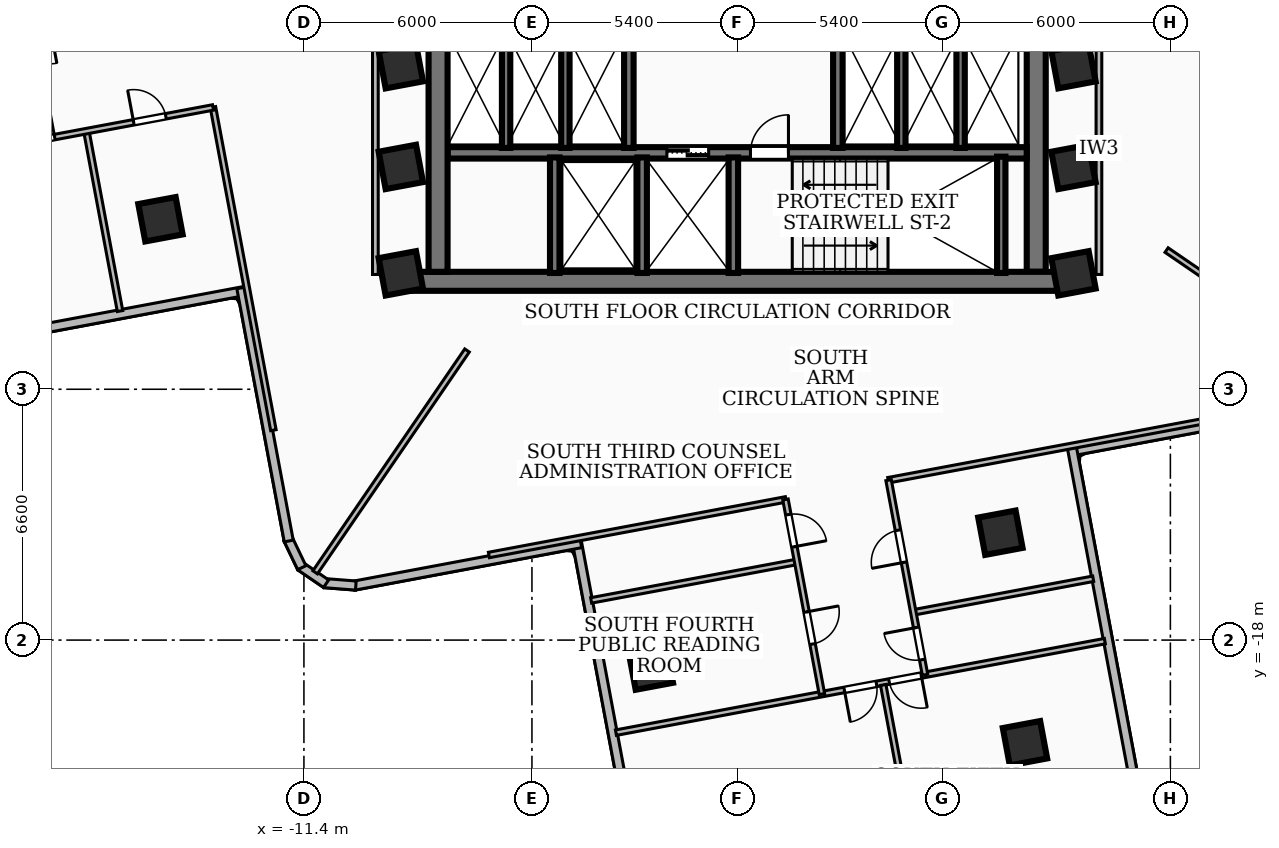
"""IFC4 building model, lengths in metres.
Left out: names, types, materials, properties, quantities, classifications, styles, units other than length and angle.
Written with IfcOpenShell. Run it as: python <this file> out.ifc"""

import sys

from ifc_helpers import new_model, si_unit, direction, frame, frame_2d, origin, origin_2d, place, context, subcontext, project, spatial, rectangle, extrude, element, fill, save


model = new_model("IFC4")
c1 = context("Model", 3, precision=1e-05, world=origin(), true_north=direction((0.0, 1.0)))
c2 = subcontext(c1, "Body", "Model", "MODEL_VIEW")
j1 = project(units=[si_unit("LENGTHUNIT", "METRE"), si_unit("PLANEANGLEUNIT", "RADIAN")], contexts=[c1])
p1 = place(None, origin())
s1 = spatial("IfcSite", under=j1, at=p1, CompositionType="ELEMENT")
p2 = place(p1, origin())
s2 = spatial("IfcBuilding", under=s1, at=p2, CompositionType="ELEMENT")
p3 = place(p2, frame((0.0, 0.0, 100.08)))
s3 = spatial("IfcBuildingStorey", under=s2, at=p3, CompositionType="ELEMENT", Elevation=100.08)
p4 = place(p3, frame((8.78, -8.56, 0.0), z_axis=(0.0, 0.0, 1.0), x_axis=(-1.0, 0.0, 0.0)))
e1 = element("IfcWall", 1, at=p4, inside=s3, PredefinedType="SHEAR", context=c2, shape_type="SweptSolid", body=[
    extrude(rectangle(XDim=17.56, YDim=0.5, at=frame_2d((8.78, 0.0))), origin(), (0.0, 0.0, 1.0), 3.34),
])
for number, where, z_axis, x_axis in (
    (2, (-7.87, -8.31, 0.0), (0.0, 0.0, 1.0), (0.0, 1.0, 0.0)),
    (3, (7.87, -2.0, 0.0), (0.0, 0.0, 1.0), (0.0, -1.0, 0.0)),
):
    element("IfcWall", number, at=place(p3, frame(where, z_axis=z_axis, x_axis=x_axis)), inside=s3, PredefinedType="SHEAR", context=c2, shape_type="SweptSolid", body=[
        extrude(rectangle(XDim=6.31, YDim=0.5, at=frame_2d((3.155, 0.0))), origin(), (0.0, 0.0, 1.0), 3.34),
    ])
p5 = place(p3, frame((-7.62, -5.18, 0.0), z_axis=(0.0, 0.0, 1.0), x_axis=(1.0, 0.0, 0.0)))
e4 = element("IfcWall", 4, at=p5, inside=s3, PredefinedType="SOLIDWALL", context=c2, shape_type="SweptSolid", body=[
    extrude(rectangle(XDim=15.24, YDim=0.3, at=frame_2d((7.62, 0.0))), origin(), (0.0, 0.0, 1.0), 3.34),
])
p6 = place(p5, frame((5.77, 0.0, 0.0)))
e5 = element("IfcOpeningElement", 5, at=p6, cuts=e4, PredefinedType="OPENING", context=c2, shape_type="SweptSolid", body=[
    extrude(rectangle(XDim=1.1, YDim=2.15, at=frame_2d((0.55, 1.075))), frame((0.0, 0.16, 0.0), z_axis=(0.0, -1.0, 0.0), x_axis=(1.0, 0.0, 0.0)), (0.0, 0.0, 1.0), 0.32),
])
p7 = place(p5, frame((7.97, 0.0, 0.0)))
e6 = element("IfcOpeningElement", 6, at=p7, cuts=e4, PredefinedType="OPENING", context=c2, shape_type="SweptSolid", body=[
    extrude(rectangle(XDim=1.0, YDim=2.1, at=frame_2d((0.5, 1.05))), frame((0.0, 0.16, 0.0), z_axis=(0.0, -1.0, 0.0), x_axis=(1.0, 0.0, 0.0)), (0.0, 0.0, 1.0), 0.32),
])
p8 = place(p3, frame((6.95, -8.34, 0.0), z_axis=(0.0, 0.0, 1.0), x_axis=(0.0, 1.0, 0.0)))
e7 = element("IfcWall", 7, at=p8, inside=s3, PredefinedType="SOLIDWALL", context=c2, shape_type="SweptSolid", body=[
    extrude(rectangle(XDim=3.06, YDim=0.22, at=frame_2d((1.53, 0.0))), origin(), (0.0, 0.0, 1.0), 3.34),
])
for number, where, z_axis, x_axis in (
    (8, (-0.1, -8.34, 0.0), (0.0, 0.0, 1.0), (0.0, 1.0, 0.0)),
    (9, (-2.5, -8.34, 0.0), (0.0, 0.0, 1.0), (0.0, 1.0, 0.0)),
    (10, (-4.8, -8.34, 0.0), (0.0, 0.0, 1.0), (0.0, 1.0, 0.0)),
):
    element("IfcWall", number, at=place(p3, frame(where, z_axis=z_axis, x_axis=x_axis)), inside=s3, PredefinedType="SOLIDWALL", context=c2, shape_type="SweptSolid", body=[
        extrude(rectangle(XDim=3.04, YDim=0.25, at=frame_2d((1.52, 0.0))), origin(), (0.0, 0.0, 1.0), 3.34),
    ])
for number, where, z_axis, x_axis in (
    (11, (-2.85, -5.05, 0.0), (0.0, 0.0, 1.0), (0.0, 1.0, 0.0)),
    (12, (2.65, -5.05, 0.0), (0.0, 0.0, 1.0), (0.0, 1.0, 0.0)),
):
    element("IfcWall", number, at=place(p3, frame(where, z_axis=z_axis, x_axis=x_axis)), inside=s3, PredefinedType="SOLIDWALL", context=c2, shape_type="SweptSolid", body=[
        extrude(rectangle(XDim=3.07, YDim=0.25, at=frame_2d((1.535, 0.0))), origin(), (0.0, 0.0, 1.0), 3.34),
    ])
for number, where, z_axis, x_axis in (
    (13, (4.32, -5.05, 0.0), (0.0, 0.0, 1.0), (0.0, 1.0, 0.0)),
    (14, (5.88, -5.05, 0.0), (0.0, 0.0, 1.0), (0.0, 1.0, 0.0)),
    (15, (-6.08, -5.05, 0.0), (0.0, 0.0, 1.0), (0.0, 1.0, 0.0)),
    (16, (-4.52, -5.05, 0.0), (0.0, 0.0, 1.0), (0.0, 1.0, 0.0)),
):
    element("IfcWall", number, at=place(p3, frame(where, z_axis=z_axis, x_axis=x_axis)), inside=s3, PredefinedType="SOLIDWALL", context=c2, shape_type="SweptSolid", body=[
        extrude(rectangle(XDim=3.07, YDim=0.22, at=frame_2d((1.535, 0.0))), origin(), (0.0, 0.0, 1.0), 3.34),
    ])
for number, where, z_axis, x_axis in (
    (17, (-8.85, -5.55, 0.0), (0.0, 0.0, 1.0), (0.983, 0.184, 0.0)),
    (18, (-8.85, -2.9, 0.0), (0.0, 0.0, 1.0), (0.983, 0.184, 0.0)),
    (19, (8.85, -5.55, 0.0), (0.0, 0.0, 1.0), (0.983, 0.184, 0.0)),
    (20, (8.85, -2.9, 0.0), (0.0, 0.0, 1.0), (0.983, 0.184, 0.0)),
    (21, (8.85, -8.35, 0.0), (0.0, 0.0, 1.0), (0.983, 0.184, 0.0)),
    (22, (-8.85, -8.35, 0.0), (0.0, 0.0, 1.0), (0.983, 0.184, 0.0)),
    (23, (-15.175, -6.927, 0.0), (0.0, 0.0, 1.0), (0.983, 0.184, 0.0)),
    (24, (-2.271, -18.724, 0.0), (0.0, 0.0, 1.0), (0.983, 0.184, 0.0)),
    (25, (6.927, -15.175, 0.0), (0.0, 0.0, 1.0), (0.983, 0.184, 0.0)),
    (26, (7.574, -20.714, 0.0), (0.0, 0.0, 1.0), (0.983, 0.184, 0.0)),
):
    element("IfcColumn", number, at=place(p3, frame(where, z_axis=z_axis, x_axis=x_axis)), inside=s3, PredefinedType="COLUMN", context=c2, shape_type="SweptSolid", body=[
        extrude(rectangle(XDim=1.0, YDim=1.0, at=origin_2d()), origin(), (0.0, 0.0, 1.0), 3.6),
    ])
p9 = place(p3, frame((-12.935, -8.809, 0.0), z_axis=(0.0, 0.0, 1.0), x_axis=(-0.982922588066, -0.184019525782, 0.0)))
e27 = element("IfcWall", 27, at=p9, inside=s3, PredefinedType="SOLIDWALL", context=c2, shape_type="SweptSolid", body=[
    extrude(rectangle(XDim=16.275, YDim=0.24, at=frame_2d((8.137, 0.0))), origin(), (0.0, 0.0, 1.0), 3.34),
])
p10 = place(p9, frame((13.675, 0.0, 0.85)))
e28 = element("IfcOpeningElement", 28, at=p10, cuts=e27, PredefinedType="OPENING", context=c2, shape_type="SweptSolid", body=[
    extrude(rectangle(XDim=1.5, YDim=1.5, at=frame_2d((0.75, 0.75))), frame((0.0, 0.13, 0.0), z_axis=(0.0, -1.0, 0.0), x_axis=(1.0, 0.0, 0.0)), (0.0, 0.0, 1.0), 0.26),
])
p11 = place(p3, frame((15.393, -11.799, 0.0), z_axis=(0.0, 0.0, 1.0), x_axis=(-0.982891759821, -0.184184115697, 0.0)))
e29 = element("IfcWall", 29, at=p11, inside=s3, PredefinedType="SOLIDWALL", context=c2, shape_type="SweptSolid", body=[
    extrude(rectangle(XDim=6.776, YDim=0.24, at=frame_2d((3.388, 0.0))), origin(), (0.0, 0.0, 1.0), 3.34),
])
p12 = place(p3, frame((8.809, -12.935, 0.0), z_axis=(0.0, 0.0, 1.0), x_axis=(0.184057484564, -0.98291548079, 0.0)))
e30 = element("IfcWall", 30, at=p12, inside=s3, PredefinedType="SOLIDWALL", context=c2, shape_type="SweptSolid", body=[
    extrude(rectangle(XDim=11.675, YDim=0.24, at=frame_2d((5.838, 0.0))), origin(), (0.0, 0.0, 1.0), 3.34),
])
p13 = place(p12, frame((8.775, 0.0, 0.85)))
e31 = element("IfcOpeningElement", 31, at=p13, cuts=e30, PredefinedType="OPENING", context=c2, shape_type="SweptSolid", body=[
    extrude(rectangle(XDim=1.8, YDim=1.6, at=frame_2d((0.9, 0.8))), frame((0.0, 0.13, 0.0), z_axis=(0.0, -1.0, 0.0), x_axis=(1.0, 0.0, 0.0)), (0.0, 0.0, 1.0), 0.26),
])
p14 = place(p3, frame((-2.076, -26.85, 0.0), z_axis=(0.0, 0.0, 1.0), x_axis=(-0.18407390356, 0.982912406081, 0.0)))
e32 = element("IfcWall", 32, at=p14, inside=s3, PredefinedType="SOLIDWALL", context=c2, shape_type="SweptSolid", body=[
    extrude(rectangle(XDim=11.676, YDim=0.24, at=frame_2d((5.838, 0.0))), origin(), (0.0, 0.0, 1.0), 2.486),
])
p15 = place(p3, frame((-4.113, -15.45, 0.0), z_axis=(0.0, 0.0, 1.0), x_axis=(-0.982913564854, -0.18406771587, 0.0)))
e33 = element("IfcWall", 33, at=p15, inside=s3, PredefinedType="SOLIDWALL", context=c2, shape_type="SweptSolid", body=[
    extrude(rectangle(XDim=6.075, YDim=0.24, at=frame_2d((3.037, 0.0))), origin(), (0.0, 0.0, 1.0), 2.486),
])
p16 = place(p3, frame((-10.034, -16.565, 0.0), z_axis=(0.0, 0.0, 1.0), x_axis=(-0.997030229365, 0.077011179273, 0.0)))
e34 = element("IfcWall", 34, at=p16, inside=s3, PredefinedType="SOLIDWALL", context=c2, shape_type="SweptSolid", body=[
    extrude(rectangle(XDim=0.831, YDim=0.24, at=frame_2d((0.415, 0.0))), origin(), (0.0, 0.0, 1.0), 3.34),
])
p17 = place(p3, frame((-10.816, -16.517, 0.0), z_axis=(0.0, 0.0, 1.0), x_axis=(-0.825814611055, 0.563941688624, 0.0)))
e35 = element("IfcWall", 35, at=p17, inside=s3, PredefinedType="SOLIDWALL", context=c2, shape_type="SweptSolid", body=[
    extrude(rectangle(XDim=0.814, YDim=0.24, at=frame_2d((0.407, 0.0))), origin(), (0.0, 0.0, 1.0), 3.34),
])
p18 = place(p3, frame((-11.456, -16.095, 0.0), z_axis=(0.0, 0.0, 1.0), x_axis=(-0.431642510533, 0.902044756706, 0.0)))
e36 = element("IfcWall", 36, at=p18, inside=s3, PredefinedType="SOLIDWALL", context=c2, shape_type="SweptSolid", body=[
    extrude(rectangle(XDim=0.832, YDim=0.24, at=frame_2d((0.416, 0.0))), origin(), (0.0, 0.0, 1.0), 3.34),
])
p19 = place(p3, frame((-11.799, -15.393, 0.0), z_axis=(0.0, 0.0, 1.0), x_axis=(-0.184184115697, 0.982891759821, 0.0)))
e37 = element("IfcWall", 37, at=p19, inside=s3, PredefinedType="SOLIDWALL", context=c2, shape_type="SweptSolid", body=[
    extrude(rectangle(XDim=6.776, YDim=0.24, at=frame_2d((3.388, 0.0))), origin(), (0.0, 0.0, 1.0), 3.34),
])
for number, where, z_axis, x_axis in (
    (38, (-9.52, -8.38, 0.0), (0.0, 0.0, 1.0), (0.0, 1.0, 0.0)),
    (39, (9.52, -8.38, 0.0), (0.0, 0.0, 1.0), (0.0, 1.0, 0.0)),
):
    element("IfcWall", number, at=place(p3, frame(where, z_axis=z_axis, x_axis=x_axis)), inside=s3, PredefinedType="PARTITIONING", context=c2, shape_type="SweptSolid", body=[
        extrude(rectangle(XDim=6.63, YDim=0.15, at=frame_2d((3.315, 0.0))), origin(), (0.0, 0.0, 1.0), 2.486),
    ])
p20 = place(p3, frame((-7.108, -10.38, 0.0), z_axis=(0.0, 0.0, 1.0), x_axis=(-0.564900413187, -0.825159089619, 0.0)))
e40 = element("IfcWall", 40, at=p20, inside=s3, PredefinedType="PARTITIONING", context=c2, shape_type="SweptSolid", body=[
    extrude(rectangle(XDim=7.074, YDim=0.145, at=frame_2d((3.537, 0.0))), origin(), (0.0, 0.0, 1.0), 2.486),
])
p21 = place(p3, frame((11.3, -7.738, 0.0), z_axis=(0.0, 0.0, 1.0), x_axis=(0.825173577049, -0.564879250584, 0.0)))
e41 = element("IfcWall", 41, at=p21, inside=s3, PredefinedType="PARTITIONING", context=c2, shape_type="SweptSolid", body=[
    extrude(rectangle(XDim=5.959, YDim=0.145, at=frame_2d((2.979, 0.0))), origin(), (0.0, 0.0, 1.0), 3.34),
])
p22 = place(p3, frame((-13.794, -3.975, 0.0), z_axis=(0.0, 0.0, 1.0), x_axis=(0.183947683851, -0.982936035358, 0.0)))
e42 = element("IfcWall", 42, at=p22, inside=s3, PredefinedType="PARTITIONING", context=c2, shape_type="SweptSolid", body=[
    extrude(rectangle(XDim=8.65, YDim=0.145, at=frame_2d((4.325, 0.0))), origin(), (0.0, 0.0, 1.0), 2.486),
])
p23 = place(p3, frame((-17.121, -4.628, 0.0), z_axis=(0.0, 0.0, 1.0), x_axis=(0.183922768694, -0.98294069768, 0.0)))
e43 = element("IfcWall", 43, at=p23, inside=s3, PredefinedType="PARTITIONING", context=c2, shape_type="SweptSolid", body=[
    extrude(rectangle(XDim=4.796, YDim=0.145, at=frame_2d((2.398, 0.0))), origin(), (0.0, 0.0, 1.0), 2.486),
])
p24 = place(p3, frame((-19.641, -5.08, 0.0), z_axis=(0.0, 0.0, 1.0), x_axis=(0.982925094433, 0.184006137763, 0.0)))
e44 = element("IfcWall", 44, at=p24, inside=s3, PredefinedType="PARTITIONING", context=c2, shape_type="SweptSolid", body=[
    extrude(rectangle(XDim=5.951, YDim=0.145, at=frame_2d((2.975, 0.0))), origin(), (0.0, 0.0, 1.0), 3.34),
])
p25 = place(p24, frame((3.826, 0.0, 0.0)))
e45 = element("IfcOpeningElement", 45, at=p25, cuts=e44, PredefinedType="OPENING", context=c2, shape_type="SweptSolid", body=[
    extrude(rectangle(XDim=0.86, YDim=2.04, at=frame_2d((0.43, 1.02))), frame((0.0, 0.083, 0.0), z_axis=(0.0, -1.0, 0.0), x_axis=(1.0, 0.0, 0.0)), (0.0, 0.0, 1.0), 0.165),
])
p26 = place(p24, frame((0.851, 0.0, 0.0)))
e46 = element("IfcOpeningElement", 46, at=p26, cuts=e44, PredefinedType="OPENING", context=c2, shape_type="SweptSolid", body=[
    extrude(rectangle(XDim=0.86, YDim=2.04, at=frame_2d((0.43, 1.02))), frame((0.0, 0.083, 0.0), z_axis=(0.0, -1.0, 0.0), x_axis=(1.0, 0.0, 0.0)), (0.0, 0.0, 1.0), 0.165),
])
p27 = place(p3, frame((3.975, -13.794, 0.0), z_axis=(0.0, 0.0, 1.0), x_axis=(0.982936035358, 0.183947683851, 0.0)))
e47 = element("IfcWall", 47, at=p27, inside=s3, PredefinedType="PARTITIONING", context=c2, shape_type="SweptSolid", body=[
    extrude(rectangle(XDim=8.65, YDim=0.145, at=frame_2d((4.325, 0.0))), origin(), (0.0, 0.0, 1.0), 2.486),
])
p28 = place(p3, frame((-6.532, -15.761, 0.0), z_axis=(0.0, 0.0, 1.0), x_axis=(0.98292290903, 0.184017811376, 0.0)))
e48 = element("IfcWall", 48, at=p28, inside=s3, PredefinedType="PARTITIONING", context=c2, shape_type="SweptSolid", body=[
    extrude(rectangle(XDim=7.95, YDim=0.145, at=frame_2d((3.975, 0.0))), origin(), (0.0, 0.0, 1.0), 2.486),
])
p29 = place(p3, frame((4.656, -17.268, 0.0), z_axis=(0.0, 0.0, 1.0), x_axis=(0.982932084341, 0.183968795106, 0.0)))
e49 = element("IfcWall", 49, at=p29, inside=s3, PredefinedType="PARTITIONING", context=c2, shape_type="SweptSolid", body=[
    extrude(rectangle(XDim=4.795, YDim=0.145, at=frame_2d((2.397, 0.0))), origin(), (0.0, 0.0, 1.0), 2.486),
])
p30 = place(p3, frame((-3.842, -16.956, 0.0), z_axis=(0.0, 0.0, 1.0), x_axis=(0.982934991676, 0.183953260746, 0.0)))
e50 = element("IfcWall", 50, at=p30, inside=s3, PredefinedType="PARTITIONING", context=c2, shape_type="SweptSolid", body=[
    extrude(rectangle(XDim=5.496, YDim=0.145, at=frame_2d((2.748, 0.0))), origin(), (0.0, 0.0, 1.0), 2.486),
])
p31 = place(p3, frame((4.944, -18.913, 0.0), z_axis=(0.0, 0.0, 1.0), x_axis=(-0.184062192303, 0.982914599222, 0.0)))
e51 = element("IfcWall", 51, at=p31, inside=s3, PredefinedType="PARTITIONING", context=c2, shape_type="SweptSolid", body=[
    extrude(rectangle(XDim=5.21, YDim=0.145, at=frame_2d((2.605, 0.0))), origin(), (0.0, 0.0, 1.0), 3.34),
])
p32 = place(p31, frame((3.01, 0.0, 0.0)))
e52 = element("IfcOpeningElement", 52, at=p32, cuts=e51, PredefinedType="OPENING", context=c2, shape_type="SweptSolid", body=[
    extrude(rectangle(XDim=0.86, YDim=2.04, at=frame_2d((0.43, 1.02))), frame((0.0, 0.083, 0.0), z_axis=(0.0, -1.0, 0.0), x_axis=(1.0, 0.0, 0.0)), (0.0, 0.0, 1.0), 0.165),
])
p33 = place(p31, frame((0.405, 0.0, 0.0)))
e53 = element("IfcOpeningElement", 53, at=p33, cuts=e51, PredefinedType="OPENING", context=c2, shape_type="SweptSolid", body=[
    extrude(rectangle(XDim=0.86, YDim=2.04, at=frame_2d((0.43, 1.02))), frame((0.0, 0.083, 0.0), z_axis=(0.0, -1.0, 0.0), x_axis=(1.0, 0.0, 0.0)), (0.0, 0.0, 1.0), 0.165),
])
p34 = place(p3, frame((1.272, -14.3, 0.0), z_axis=(0.0, 0.0, 1.0), x_axis=(0.184070670298, -0.982913011581, 0.0)))
e54 = element("IfcWall", 54, at=p34, inside=s3, PredefinedType="PARTITIONING", context=c2, shape_type="SweptSolid", body=[
    extrude(rectangle(XDim=5.21, YDim=0.145, at=frame_2d((2.605, 0.0))), origin(), (0.0, 0.0, 1.0), 3.34),
])
p35 = place(p34, frame((0.405, 0.0, 0.0)))
e55 = element("IfcOpeningElement", 55, at=p35, cuts=e54, PredefinedType="OPENING", context=c2, shape_type="SweptSolid", body=[
    extrude(rectangle(XDim=0.86, YDim=2.04, at=frame_2d((0.43, 1.02))), frame((0.0, 0.083, 0.0), z_axis=(0.0, -1.0, 0.0), x_axis=(1.0, 0.0, 0.0)), (0.0, 0.0, 1.0), 0.165),
])
p36 = place(p34, frame((3.01, 0.0, 0.0)))
e56 = element("IfcOpeningElement", 56, at=p36, cuts=e54, PredefinedType="OPENING", context=c2, shape_type="SweptSolid", body=[
    extrude(rectangle(XDim=0.86, YDim=2.04, at=frame_2d((0.43, 1.02))), frame((0.0, 0.083, 0.0), z_axis=(0.0, -1.0, 0.0), x_axis=(1.0, 0.0, 0.0)), (0.0, 0.0, 1.0), 0.165),
])
p37 = place(p3, frame((3.844, -19.18, 0.0), z_axis=(0.0, 0.0, 1.0), x_axis=(0.183912237739, -0.982942668119, 0.0)))
e57 = element("IfcWall", 57, at=p37, inside=s3, PredefinedType="PARTITIONING", context=c2, shape_type="SweptSolid", body=[
    extrude(rectangle(XDim=7.835, YDim=0.145, at=frame_2d((3.917, 0.0))), origin(), (0.0, 0.0, 1.0), 2.832),
])
p38 = place(p3, frame((9.676, -18.028, 0.0), z_axis=(0.0, 0.0, 1.0), x_axis=(-0.98293315623, -0.183963067988, 0.0)))
e58 = element("IfcWall", 58, at=p38, inside=s3, PredefinedType="PARTITIONING", context=c2, shape_type="SweptSolid", body=[
    extrude(rectangle(XDim=13.089, YDim=0.145, at=frame_2d((6.545, 0.0))), origin(), (0.0, 0.0, 1.0), 2.486),
])
p39 = place(p38, frame((6.115, 0.0, 0.0)))
e59 = element("IfcOpeningElement", 59, at=p39, cuts=e58, PredefinedType="OPENING", context=c2, shape_type="SweptSolid", body=[
    extrude(rectangle(XDim=0.86, YDim=2.04, at=frame_2d((0.43, 1.02))), frame((0.0, 0.083, 0.0), z_axis=(0.0, -1.0, 0.0), x_axis=(1.0, 0.0, 0.0)), (0.0, 0.0, 1.0), 0.165),
])
p40 = place(p38, frame((4.915, 0.0, 0.0)))
e60 = element("IfcOpeningElement", 60, at=p40, cuts=e58, PredefinedType="OPENING", context=c2, shape_type="SweptSolid", body=[
    extrude(rectangle(XDim=0.86, YDim=2.04, at=frame_2d((0.43, 1.02))), frame((0.0, 0.083, 0.0), z_axis=(0.0, -1.0, 0.0), x_axis=(1.0, 0.0, 0.0)), (0.0, 0.0, 1.0), 0.165),
])
p41 = place(p6, origin())
e61 = element("IfcDoor", 61, at=p41, inside=s3, OperationType="DOUBLE_DOOR_SLIDING", PredefinedType="DOOR", context=c2, shape_type="SweptSolid", body=[
    extrude(rectangle(XDim=1.1, YDim=2.15, at=frame_2d((0.55, 1.075))), frame((0.0, 0.025, 0.0), z_axis=(0.0, -1.0, 0.0), x_axis=(1.0, 0.0, 0.0)), (0.0, 0.0, 1.0), 0.05),
])
fill(e5, e61)
p42 = place(p7, origin())
e62 = element("IfcDoor", 62, at=p42, inside=s3, OperationType="SINGLE_SWING_RIGHT", PredefinedType="DOOR", context=c2, shape_type="SweptSolid", body=[
    extrude(rectangle(XDim=1.0, YDim=2.1, at=frame_2d((0.5, 1.05))), frame((0.0, 0.025, 0.0), z_axis=(0.0, -1.0, 0.0), x_axis=(1.0, 0.0, 0.0)), (0.0, 0.0, 1.0), 0.05),
])
fill(e6, e62)
p43 = place(p25, origin())
e63 = element("IfcDoor", 63, at=p43, inside=s3, OperationType="SINGLE_SWING_LEFT", PredefinedType="DOOR", context=c2, shape_type="SweptSolid", body=[
    extrude(rectangle(XDim=0.86, YDim=2.04, at=frame_2d((0.43, 1.02))), frame((0.0, 0.025, 0.0), z_axis=(0.0, -1.0, 0.0), x_axis=(1.0, 0.0, 0.0)), (0.0, 0.0, 1.0), 0.05),
])
fill(e45, e63)
p44 = place(p26, origin())
e64 = element("IfcDoor", 64, at=p44, inside=s3, OperationType="SINGLE_SWING_RIGHT", PredefinedType="DOOR", context=c2, shape_type="SweptSolid", body=[
    extrude(rectangle(XDim=0.86, YDim=2.04, at=frame_2d((0.43, 1.02))), frame((0.0, 0.025, 0.0), z_axis=(0.0, -1.0, 0.0), x_axis=(1.0, 0.0, 0.0)), (0.0, 0.0, 1.0), 0.05),
])
fill(e46, e64)
p45 = place(p32, origin())
e65 = element("IfcDoor", 65, at=p45, inside=s3, OperationType="SINGLE_SWING_LEFT", PredefinedType="DOOR", context=c2, shape_type="SweptSolid", body=[
    extrude(rectangle(XDim=0.86, YDim=2.04, at=frame_2d((0.43, 1.02))), frame((0.0, 0.025, 0.0), z_axis=(0.0, -1.0, 0.0), x_axis=(1.0, 0.0, 0.0)), (0.0, 0.0, 1.0), 0.05),
])
fill(e52, e65)
p46 = place(p33, origin())
e66 = element("IfcDoor", 66, at=p46, inside=s3, OperationType="SINGLE_SWING_RIGHT", PredefinedType="DOOR", context=c2, shape_type="SweptSolid", body=[
    extrude(rectangle(XDim=0.86, YDim=2.04, at=frame_2d((0.43, 1.02))), frame((0.0, 0.025, 0.0), z_axis=(0.0, -1.0, 0.0), x_axis=(1.0, 0.0, 0.0)), (0.0, 0.0, 1.0), 0.05),
])
fill(e53, e66)
p47 = place(p35, origin())
e67 = element("IfcDoor", 67, at=p47, inside=s3, OperationType="SINGLE_SWING_RIGHT", PredefinedType="DOOR", context=c2, shape_type="SweptSolid", body=[
    extrude(rectangle(XDim=0.86, YDim=2.04, at=frame_2d((0.43, 1.02))), frame((0.0, 0.025, 0.0), z_axis=(0.0, -1.0, 0.0), x_axis=(1.0, 0.0, 0.0)), (0.0, 0.0, 1.0), 0.05),
])
fill(e55, e67)
p48 = place(p36, origin())
e68 = element("IfcDoor", 68, at=p48, inside=s3, OperationType="SINGLE_SWING_LEFT", PredefinedType="DOOR", context=c2, shape_type="SweptSolid", body=[
    extrude(rectangle(XDim=0.86, YDim=2.04, at=frame_2d((0.43, 1.02))), frame((0.0, 0.025, 0.0), z_axis=(0.0, -1.0, 0.0), x_axis=(1.0, 0.0, 0.0)), (0.0, 0.0, 1.0), 0.05),
])
fill(e56, e68)
p49 = place(p39, origin())
e69 = element("IfcDoor", 69, at=p49, inside=s3, OperationType="SINGLE_SWING_RIGHT", PredefinedType="DOOR", context=c2, shape_type="SweptSolid", body=[
    extrude(rectangle(XDim=0.86, YDim=2.04, at=frame_2d((0.43, 1.02))), frame((0.0, 0.025, 0.0), z_axis=(0.0, -1.0, 0.0), x_axis=(1.0, 0.0, 0.0)), (0.0, 0.0, 1.0), 0.05),
])
fill(e59, e69)
p50 = place(p40, origin())
e70 = element("IfcDoor", 70, at=p50, inside=s3, OperationType="SINGLE_SWING_LEFT", PredefinedType="DOOR", context=c2, shape_type="SweptSolid", body=[
    extrude(rectangle(XDim=0.86, YDim=2.04, at=frame_2d((0.43, 1.02))), frame((0.0, 0.025, 0.0), z_axis=(0.0, -1.0, 0.0), x_axis=(1.0, 0.0, 0.0)), (0.0, 0.0, 1.0), 0.05),
])
fill(e60, e70)
save(model, sys.argv[1])
